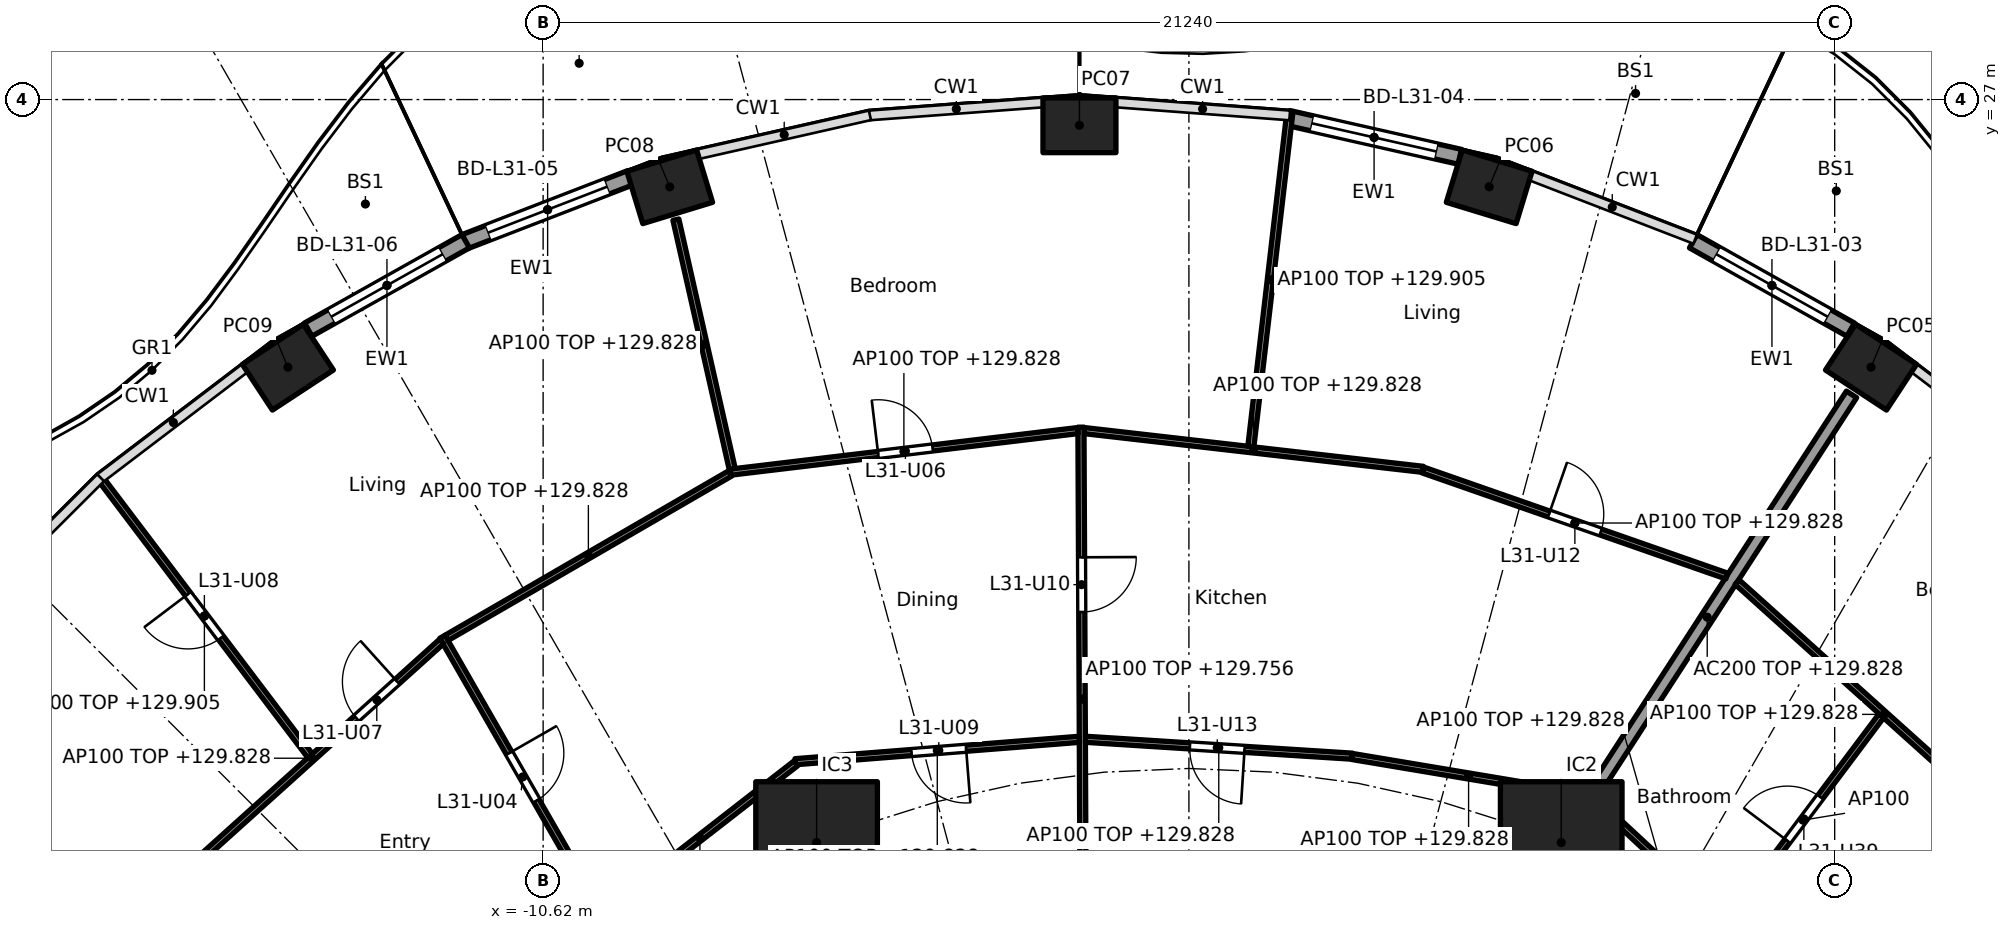
"""IFC4 building model, lengths in metres.
Left out: names, types, materials, properties, quantities, classifications, styles, units other than length and angle.
Written with IfcOpenShell. Run it as: python <this file> out.ifc"""

import sys

from ifc_helpers import new_model, si_unit, direction, frame, frame_2d, origin, origin_2d, place, context, subcontext, project, spatial, rectangle, hollow_rectangle, extrude, element, fill, save


model = new_model("IFC4")
c1 = context("Model", 3, precision=1e-05, world=origin(), true_north=direction((0.0, 1.0)))
c2 = subcontext(c1, "Body", "Model", "MODEL_VIEW")
j1 = project(units=[si_unit("LENGTHUNIT", "METRE"), si_unit("PLANEANGLEUNIT", "RADIAN")], contexts=[c1])
p1 = place(None, origin())
s1 = spatial("IfcSite", under=j1, at=p1, CompositionType="ELEMENT")
p2 = place(p1, origin())
s2 = spatial("IfcBuilding", under=s1, at=p2, CompositionType="ELEMENT")
p3 = place(p2, frame((0.0, 0.0, 127.0)))
s3 = spatial("IfcBuildingStorey", under=s2, at=p3, CompositionType="ELEMENT", Elevation=127.0)
for number, where, z_axis, x_axis in (
    (1, (11.218, 22.599, 0.0), (0.0, 0.0, 1.0), (-0.836, 0.549, 0.0)),
    (2, (4.938, 25.565, 0.0), (0.0, 0.0, 1.0), (-0.957, 0.292, 0.0)),
    (3, (-1.8, 26.577, 0.0), (0.0, 0.0, 1.0), (-1.0, 0.0, 0.0)),
    (4, (-8.538, 25.565, 0.0), (0.0, 0.0, 1.0), (-0.957, -0.292, 0.0)),
    (5, (-14.817, 22.599, 0.0), (0.0, 0.0, 1.0), (-0.836, -0.549, 0.0)),
):
    element("IfcColumn", number, at=place(p3, frame(where, z_axis=z_axis, x_axis=x_axis)), inside=s3, PredefinedType="COLUMN", context=c2, shape_type="SweptSolid", body=[
        extrude(hollow_rectangle(XDim=1.2, YDim=0.9, WallThickness=0.04, at=origin_2d()), origin(), (0.0, 0.0, 1.0), 3.7),
    ])
for number, where, z_axis, x_axis in (
    (6, (6.123, 14.782, 0.0), (0.0, 0.0, 1.0), (1.0, 0.0, 0.0)),
    (7, (-6.123, 14.782, 0.0), (0.0, 0.0, 1.0), (1.0, 0.0, 0.0)),
):
    element("IfcColumn", number, at=place(p3, frame(where, z_axis=z_axis, x_axis=x_axis)), inside=s3, PredefinedType="COLUMN", context=c2, shape_type="SweptSolid", body=[
        extrude(rectangle(XDim=2.0, YDim=2.0, at=origin_2d()), origin(), (0.0, 0.0, 1.0), 3.7),
    ])
p4 = place(p3, frame((8.293, 24.67, 0.0), z_axis=(0.0, 0.0, 1.0), x_axis=(0.87206688547, -0.489386705241, 0.0)))
e8 = element("IfcWall", 8, at=p4, inside=s3, PredefinedType="SOLIDWALL", context=c2, shape_type="SweptSolid", body=[
    extrude(rectangle(XDim=2.97, YDim=0.25, at=frame_2d((1.485, 0.0))), origin(), (0.0, 0.0, 1.0), 3.44),
])
p5 = place(p4, frame((0.435, 0.0, 0.0)))
e9 = element("IfcOpeningElement", 9, at=p5, cuts=e8, PredefinedType="OPENING", context=c2, shape_type="SweptSolid", body=[
    extrude(rectangle(XDim=2.1, YDim=2.4, at=frame_2d((1.05, 1.2))), frame((0.0, 0.135, 0.0), z_axis=(0.0, -1.0, 0.0), x_axis=(1.0, 0.0, 0.0)), (0.0, 0.0, 1.0), 0.27),
])
p6 = place(p3, frame((1.636, 26.697, 0.0), z_axis=(0.0, 0.0, 1.0), x_axis=(0.975339035722, -0.220711951186, 0.0)))
e10 = element("IfcWall", 10, at=p6, inside=s3, PredefinedType="SOLIDWALL", context=c2, shape_type="SweptSolid", body=[
    extrude(rectangle(XDim=2.89, YDim=0.25, at=frame_2d((1.445, 0.0))), origin(), (0.0, 0.0, 1.0), 3.44),
])
p7 = place(p6, frame((0.395, 0.0, 0.0)))
e11 = element("IfcOpeningElement", 11, at=p7, cuts=e10, PredefinedType="OPENING", context=c2, shape_type="SweptSolid", body=[
    extrude(rectangle(XDim=2.1, YDim=2.4, at=frame_2d((1.05, 1.2))), frame((0.0, 0.135, 0.0), z_axis=(0.0, -1.0, 0.0), x_axis=(1.0, 0.0, 0.0)), (0.0, 0.0, 1.0), 0.27),
])
p8 = place(p3, frame((-11.909, 24.662, 0.0), z_axis=(0.0, 0.0, 1.0), x_axis=(0.932845344347, 0.360277064952, 0.0)))
e12 = element("IfcWall", 12, at=p8, inside=s3, PredefinedType="SOLIDWALL", context=c2, shape_type="SweptSolid", body=[
    extrude(rectangle(XDim=2.923, YDim=0.25, at=frame_2d((1.462, 0.0))), origin(), (0.0, 0.0, 1.0), 3.44),
])
p9 = place(p8, frame((0.412, 0.0, 0.0)))
e13 = element("IfcOpeningElement", 13, at=p9, cuts=e12, PredefinedType="OPENING", context=c2, shape_type="SweptSolid", body=[
    extrude(rectangle(XDim=2.1, YDim=2.4, at=frame_2d((1.05, 1.2))), frame((0.0, 0.135, 0.0), z_axis=(0.0, -1.0, 0.0), x_axis=(1.0, 0.0, 0.0)), (0.0, 0.0, 1.0), 0.27),
])
p10 = place(p3, frame((-14.483, 23.217, 0.0), z_axis=(0.0, 0.0, 1.0), x_axis=(0.87206688547, 0.489386705241, 0.0)))
e14 = element("IfcWall", 14, at=p10, inside=s3, PredefinedType="SOLIDWALL", context=c2, shape_type="SweptSolid", body=[
    extrude(rectangle(XDim=2.97, YDim=0.25, at=frame_2d((1.485, 0.0))), origin(), (0.0, 0.0, 1.0), 3.44),
])
p11 = place(p10, frame((0.435, 0.0, 0.0)))
e15 = element("IfcOpeningElement", 15, at=p11, cuts=e14, PredefinedType="OPENING", context=c2, shape_type="SweptSolid", body=[
    extrude(rectangle(XDim=2.1, YDim=2.4, at=frame_2d((1.05, 1.2))), frame((0.0, 0.135, 0.0), z_axis=(0.0, -1.0, 0.0), x_axis=(1.0, 0.0, 0.0)), (0.0, 0.0, 1.0), 0.27),
])
p12 = place(p3, frame((5.243, 12.657, 0.0), z_axis=(0.0, 0.0, 1.0), x_axis=(0.38273085373, 0.923859888513, 0.0)))
e16 = element("IfcWall", 16, at=p12, inside=s3, PredefinedType="PARTITIONING", context=c2, shape_type="SweptSolid", body=[
    extrude(rectangle(XDim=2.199, YDim=0.2, at=frame_2d((1.1, 0.0))), origin(), (0.0, 0.0, 1.0), 3.44),
])
p13 = place(p3, frame((6.15, 14.824, 0.0), z_axis=(0.0, 0.0, 1.0), x_axis=(0.543695254109, 0.839282711998, 0.0)))
e17 = element("IfcWall", 17, at=p13, inside=s3, PredefinedType="PARTITIONING", context=c2, shape_type="SweptSolid", body=[
    extrude(rectangle(XDim=8.731, YDim=0.2, at=frame_2d((4.366, 0.0))), origin(), (0.0, 0.0, 1.0), 2.828),
])
p14 = place(p3, frame((13.856, 14.714, 0.0), z_axis=(0.0, 0.0, 1.0), x_axis=(-0.743799395746, 0.668402916577, 0.0)))
e18 = element("IfcWall", 18, at=p14, inside=s3, PredefinedType="PARTITIONING", context=c2, shape_type="SweptSolid", body=[
    extrude(rectangle(XDim=6.509, YDim=0.1, at=frame_2d((3.254, 0.0))), origin(), (0.0, 0.0, 1.0), 2.828),
])
p15 = place(p14, frame((1.19, 0.0, 0.0)))
e19 = element("IfcOpeningElement", 19, at=p15, cuts=e18, PredefinedType="OPENING", context=c2, shape_type="SweptSolid", body=[
    extrude(rectangle(XDim=0.9, YDim=2.1, at=frame_2d((0.45, 1.05))), frame((0.0, 0.06, 0.0), z_axis=(0.0, -1.0, 0.0), x_axis=(1.0, 0.0, 0.0)), (0.0, 0.0, 1.0), 0.12),
])
p16 = place(p3, frame((8.81, 13.434, 0.0), z_axis=(0.0, 0.0, 1.0), x_axis=(0.600491337497, 0.799631261014, 0.0)))
e20 = element("IfcWall", 20, at=p16, inside=s3, PredefinedType="PARTITIONING", context=c2, shape_type="SweptSolid", body=[
    extrude(rectangle(XDim=4.292, YDim=0.1, at=frame_2d((2.146, 0.0))), origin(), (0.0, 0.0, 1.0), 3.44),
])
p17 = place(p16, frame((1.721, 0.0, 0.0)))
e21 = element("IfcOpeningElement", 21, at=p17, cuts=e20, PredefinedType="OPENING", context=c2, shape_type="SweptSolid", body=[
    extrude(rectangle(XDim=0.9, YDim=2.1, at=frame_2d((0.45, 1.05))), frame((0.0, 0.06, 0.0), z_axis=(0.0, -1.0, 0.0), x_axis=(1.0, 0.0, 0.0)), (0.0, 0.0, 1.0), 0.12),
])
p18 = place(p3, frame((8.803, 13.508, 0.0), z_axis=(0.0, 0.0, 1.0), x_axis=(-0.733124766325, 0.680094167745, 0.0)))
e22 = element("IfcWall", 22, at=p18, inside=s3, PredefinedType="PARTITIONING", context=c2, shape_type="SweptSolid", body=[
    extrude(rectangle(XDim=2.886, YDim=0.1, at=frame_2d((1.443, 0.0))), origin(), (0.0, 0.0, 1.0), 2.828),
])
p19 = place(p3, frame((6.515, 15.556, 0.0), z_axis=(0.0, 0.0, 1.0), x_axis=(-0.986271328884, 0.16513287323, 0.0)))
e23 = element("IfcWall", 23, at=p19, inside=s3, PredefinedType="PARTITIONING", context=c2, shape_type="SweptSolid", body=[
    extrude(rectangle(XDim=3.884, YDim=0.1, at=frame_2d((1.942, 0.0))), origin(), (0.0, 0.0, 1.0), 2.828),
])
p20 = place(p3, frame((8.846, 19.165, 0.0), z_axis=(0.0, 0.0, 1.0), x_axis=(-0.944186503813, 0.329411362915, 0.0)))
e24 = element("IfcWall", 24, at=p20, inside=s3, PredefinedType="PARTITIONING", context=c2, shape_type="SweptSolid", body=[
    extrude(rectangle(XDim=5.293, YDim=0.1, at=frame_2d((2.646, 0.0))), origin(), (0.0, 0.0, 1.0), 2.828),
])
p21 = place(p20, frame((2.197, 0.0, 0.0)))
e25 = element("IfcOpeningElement", 25, at=p21, cuts=e24, PredefinedType="OPENING", context=c2, shape_type="SweptSolid", body=[
    extrude(rectangle(XDim=0.9, YDim=2.1, at=frame_2d((0.45, 1.05))), frame((0.0, 0.06, 0.0), z_axis=(0.0, -1.0, 0.0), x_axis=(1.0, 0.0, 0.0)), (0.0, 0.0, 1.0), 0.12),
])
p22 = place(p3, frame((2.685, 16.202, 0.0), z_axis=(0.0, 0.0, 1.0), x_axis=(-0.998000808042, 0.063201164138, 0.0)))
e26 = element("IfcWall", 26, at=p22, inside=s3, PredefinedType="PARTITIONING", context=c2, shape_type="SweptSolid", body=[
    extrude(rectangle(XDim=4.396, YDim=0.1, at=frame_2d((2.198, 0.0))), origin(), (0.0, 0.0, 1.0), 2.828),
])
p23 = place(p22, frame((1.773, 0.0, 0.0)))
e27 = element("IfcOpeningElement", 27, at=p23, cuts=e26, PredefinedType="OPENING", context=c2, shape_type="SweptSolid", body=[
    extrude(rectangle(XDim=0.9, YDim=2.1, at=frame_2d((0.45, 1.05))), frame((0.0, 0.06, 0.0), z_axis=(0.0, -1.0, 0.0), x_axis=(1.0, 0.0, 0.0)), (0.0, 0.0, 1.0), 0.12),
])
p24 = place(p3, frame((3.851, 20.919, 0.0), z_axis=(0.0, 0.0, 1.0), x_axis=(-0.993519908136, 0.11365822512, 0.0)))
e28 = element("IfcWall", 28, at=p24, inside=s3, PredefinedType="PARTITIONING", context=c2, shape_type="SweptSolid", body=[
    extrude(rectangle(XDim=5.613, YDim=0.1, at=frame_2d((2.806, 0.0))), origin(), (0.0, 0.0, 1.0), 2.828),
])
p25 = place(p3, frame((1.019, 21.293, 0.0), z_axis=(0.0, 0.0, 1.0), x_axis=(0.11589741608, 0.993261188684, 0.0)))
e29 = element("IfcWall", 29, at=p25, inside=s3, PredefinedType="PARTITIONING", context=c2, shape_type="SweptSolid", body=[
    extrude(rectangle(XDim=5.523, YDim=0.1, at=frame_2d((2.762, 0.0))), origin(), (0.0, 0.0, 1.0), 2.905),
])
p26 = place(p3, frame((-1.735, 12.665, 0.0), z_axis=(0.0, 0.0, 1.0), x_axis=(-0.004474716456, 0.999989988406, 0.0)))
e30 = element("IfcWall", 30, at=p26, inside=s3, PredefinedType="PARTITIONING", context=c2, shape_type="SweptSolid", body=[
    extrude(rectangle(XDim=8.948, YDim=0.1, at=frame_2d((4.474, 0.0))), origin(), (0.0, 0.0, 1.0), 2.756),
])
p27 = place(p26, frame((5.908, 0.0, 0.0)))
e31 = element("IfcOpeningElement", 31, at=p27, cuts=e30, PredefinedType="OPENING", context=c2, shape_type="SweptSolid", body=[
    extrude(rectangle(XDim=0.9, YDim=2.1, at=frame_2d((0.45, 1.05))), frame((0.0, 0.06, 0.0), z_axis=(0.0, -1.0, 0.0), x_axis=(1.0, 0.0, 0.0)), (0.0, 0.0, 1.0), 0.12),
])
p28 = place(p3, frame((-1.802, 16.479, 0.0), z_axis=(0.0, 0.0, 1.0), x_axis=(-0.996909003513, -0.078564869469, 0.0)))
e32 = element("IfcWall", 32, at=p28, inside=s3, PredefinedType="PARTITIONING", context=c2, shape_type="SweptSolid", body=[
    extrude(rectangle(XDim=4.686, YDim=0.1, at=frame_2d((2.343, 0.0))), origin(), (0.0, 0.0, 1.0), 2.828),
])
p29 = place(p28, frame((1.868, 0.0, 0.0)))
e33 = element("IfcOpeningElement", 33, at=p29, cuts=e32, PredefinedType="OPENING", context=c2, shape_type="SweptSolid", body=[
    extrude(rectangle(XDim=0.9, YDim=2.1, at=frame_2d((0.45, 1.05))), frame((0.0, 0.06, 0.0), z_axis=(0.0, -1.0, 0.0), x_axis=(1.0, 0.0, 0.0)), (0.0, 0.0, 1.0), 0.12),
])
p30 = place(p3, frame((-1.825, 21.557, 0.0), z_axis=(0.0, 0.0, 1.0), x_axis=(-0.992915657947, -0.118821278412, 0.0)))
e34 = element("IfcWall", 34, at=p30, inside=s3, PredefinedType="PARTITIONING", context=c2, shape_type="SweptSolid", body=[
    extrude(rectangle(XDim=5.765, YDim=0.1, at=frame_2d((2.883, 0.0))), origin(), (0.0, 0.0, 1.0), 2.828),
])
p31 = place(p30, frame((2.408, 0.0, 0.0)))
e35 = element("IfcOpeningElement", 35, at=p31, cuts=e34, PredefinedType="OPENING", context=c2, shape_type="SweptSolid", body=[
    extrude(rectangle(XDim=0.9, YDim=2.1, at=frame_2d((0.45, 1.05))), frame((0.0, 0.06, 0.0), z_axis=(0.0, -1.0, 0.0), x_axis=(1.0, 0.0, 0.0)), (0.0, 0.0, 1.0), 0.12),
])
p32 = place(p3, frame((-5.243, 12.657, 0.0), z_axis=(0.0, 0.0, 1.0), x_axis=(-0.382719158442, 0.923864733477, 0.0)))
e36 = element("IfcWall", 36, at=p32, inside=s3, PredefinedType="PARTITIONING", context=c2, shape_type="SweptSolid", body=[
    extrude(rectangle(XDim=2.25, YDim=0.1, at=frame_2d((1.125, 0.0))), origin(), (0.0, 0.0, 1.0), 3.44),
])
p33 = place(p3, frame((-6.463, 16.084, 0.0), z_axis=(0.0, 0.0, 1.0), x_axis=(-0.789457442969, -0.613805299538, 0.0)))
e37 = element("IfcWall", 37, at=p33, inside=s3, PredefinedType="PARTITIONING", context=c2, shape_type="SweptSolid", body=[
    extrude(rectangle(XDim=3.997, YDim=0.1, at=frame_2d((1.999, 0.0))), origin(), (0.0, 0.0, 1.0), 2.828),
])
p34 = place(p3, frame((-7.511, 20.927, 0.0), z_axis=(0.0, 0.0, 1.0), x_axis=(-0.220337559031, 0.975423682345, 0.0)))
e38 = element("IfcWall", 38, at=p34, inside=s3, PredefinedType="PARTITIONING", context=c2, shape_type="SweptSolid", body=[
    extrude(rectangle(XDim=4.202, YDim=0.1, at=frame_2d((2.101, 0.0))), origin(), (0.0, 0.0, 1.0), 2.828),
])
p35 = place(p3, frame((-7.543, 20.853, 0.0), z_axis=(0.0, 0.0, 1.0), x_axis=(-0.865086194899, -0.501623240485, 0.0)))
e39 = element("IfcWall", 39, at=p35, inside=s3, PredefinedType="PARTITIONING", context=c2, shape_type="SweptSolid", body=[
    extrude(rectangle(XDim=5.393, YDim=0.1, at=frame_2d((2.697, 0.0))), origin(), (0.0, 0.0, 1.0), 2.828),
])
p36 = place(p3, frame((-7.708, 10.198, 0.0), z_axis=(0.0, 0.0, 1.0), x_axis=(-0.497449462689, 0.867492957937, 0.0)))
e40 = element("IfcWall", 40, at=p36, inside=s3, PredefinedType="PARTITIONING", context=c2, shape_type="SweptSolid", body=[
    extrude(rectangle(XDim=9.185, YDim=0.1, at=frame_2d((4.592, 0.0))), origin(), (0.0, 0.0, 1.0), 2.756),
])
p37 = place(p36, frame((1.511, 0.0, 0.0)))
e41 = element("IfcOpeningElement", 41, at=p37, cuts=e40, PredefinedType="OPENING", context=c2, shape_type="SweptSolid", body=[
    extrude(rectangle(XDim=0.9, YDim=2.1, at=frame_2d((0.45, 1.05))), frame((0.0, 0.06, 0.0), z_axis=(0.0, -1.0, 0.0), x_axis=(1.0, 0.0, 0.0)), (0.0, 0.0, 1.0), 0.12),
])
p38 = place(p36, frame((6.078, 0.0, 0.0)))
e42 = element("IfcOpeningElement", 42, at=p38, cuts=e40, PredefinedType="OPENING", context=c2, shape_type="SweptSolid", body=[
    extrude(rectangle(XDim=0.9, YDim=2.1, at=frame_2d((0.45, 1.05))), frame((0.0, 0.06, 0.0), z_axis=(0.0, -1.0, 0.0), x_axis=(1.0, 0.0, 0.0)), (0.0, 0.0, 1.0), 0.12),
])
p39 = place(p3, frame((-12.289, 18.089, 0.0), z_axis=(0.0, 0.0, 1.0), x_axis=(-0.743146066164, -0.669129228435, 0.0)))
e43 = element("IfcWall", 43, at=p39, inside=s3, PredefinedType="PARTITIONING", context=c2, shape_type="SweptSolid", body=[
    extrude(rectangle(XDim=5.739, YDim=0.1, at=frame_2d((2.87, 0.0))), origin(), (0.0, 0.0, 1.0), 2.828),
])
p40 = place(p39, frame((0.985, 0.0, 0.0)))
e44 = element("IfcOpeningElement", 44, at=p40, cuts=e43, PredefinedType="OPENING", context=c2, shape_type="SweptSolid", body=[
    extrude(rectangle(XDim=0.9, YDim=2.1, at=frame_2d((0.45, 1.05))), frame((0.0, 0.06, 0.0), z_axis=(0.0, -1.0, 0.0), x_axis=(1.0, 0.0, 0.0)), (0.0, 0.0, 1.0), 0.12),
])
p41 = place(p3, frame((-14.452, 16.208, 0.0), z_axis=(0.0, 0.0, 1.0), x_axis=(-0.603267974074, 0.797538557975, 0.0)))
e45 = element("IfcWall", 45, at=p41, inside=s3, PredefinedType="PARTITIONING", context=c2, shape_type="SweptSolid", body=[
    extrude(rectangle(XDim=5.764, YDim=0.1, at=frame_2d((2.882, 0.0))), origin(), (0.0, 0.0, 1.0), 2.905),
])
p42 = place(p41, frame((2.432, 0.0, 0.0)))
e46 = element("IfcOpeningElement", 46, at=p42, cuts=e45, PredefinedType="OPENING", context=c2, shape_type="SweptSolid", body=[
    extrude(rectangle(XDim=0.9, YDim=2.1, at=frame_2d((0.45, 1.05))), frame((0.0, 0.06, 0.0), z_axis=(0.0, -1.0, 0.0), x_axis=(1.0, 0.0, 0.0)), (0.0, 0.0, 1.0), 0.12),
])
p43 = place(p5, origin())
e47 = element("IfcDoor", 47, at=p43, inside=s3, OperationType="SLIDING_TO_LEFT", PredefinedType="DOOR", context=c2, shape_type="SweptSolid", body=[
    extrude(rectangle(XDim=2.1, YDim=2.4, at=frame_2d((1.05, 1.2))), frame((0.0, 0.025, 0.0), z_axis=(0.0, -1.0, 0.0), x_axis=(1.0, 0.0, 0.0)), (0.0, 0.0, 1.0), 0.05),
])
fill(e9, e47)
p44 = place(p7, origin())
e48 = element("IfcDoor", 48, at=p44, inside=s3, OperationType="SLIDING_TO_LEFT", PredefinedType="DOOR", context=c2, shape_type="SweptSolid", body=[
    extrude(rectangle(XDim=2.1, YDim=2.4, at=frame_2d((1.05, 1.2))), frame((0.0, 0.025, 0.0), z_axis=(0.0, -1.0, 0.0), x_axis=(1.0, 0.0, 0.0)), (0.0, 0.0, 1.0), 0.05),
])
fill(e11, e48)
p45 = place(p9, origin())
e49 = element("IfcDoor", 49, at=p45, inside=s3, OperationType="SLIDING_TO_LEFT", PredefinedType="DOOR", context=c2, shape_type="SweptSolid", body=[
    extrude(rectangle(XDim=2.1, YDim=2.4, at=frame_2d((1.05, 1.2))), frame((0.0, 0.025, 0.0), z_axis=(0.0, -1.0, 0.0), x_axis=(1.0, 0.0, 0.0)), (0.0, 0.0, 1.0), 0.05),
])
fill(e13, e49)
p46 = place(p11, origin())
e50 = element("IfcDoor", 50, at=p46, inside=s3, OperationType="SLIDING_TO_LEFT", PredefinedType="DOOR", context=c2, shape_type="SweptSolid", body=[
    extrude(rectangle(XDim=2.1, YDim=2.4, at=frame_2d((1.05, 1.2))), frame((0.0, 0.025, 0.0), z_axis=(0.0, -1.0, 0.0), x_axis=(1.0, 0.0, 0.0)), (0.0, 0.0, 1.0), 0.05),
])
fill(e15, e50)
p47 = place(p38, frame((0.9, 0.0, 0.0), x_axis=(-1.0, 0.0, 0.0)))
e51 = element("IfcDoor", 51, at=p47, inside=s3, OperationType="SINGLE_SWING_LEFT", PredefinedType="DOOR", context=c2, shape_type="SweptSolid", body=[
    extrude(rectangle(XDim=0.9, YDim=2.1, at=frame_2d((0.45, 1.05))), frame((0.0, 0.025, 0.0), z_axis=(0.0, -1.0, 0.0), x_axis=(1.0, 0.0, 0.0)), (0.0, 0.0, 1.0), 0.05),
])
fill(e42, e51)
p48 = place(p31, frame((0.9, 0.0, 0.0), x_axis=(-1.0, 0.0, 0.0)))
e52 = element("IfcDoor", 52, at=p48, inside=s3, OperationType="SINGLE_SWING_LEFT", PredefinedType="DOOR", context=c2, shape_type="SweptSolid", body=[
    extrude(rectangle(XDim=0.9, YDim=2.1, at=frame_2d((0.45, 1.05))), frame((0.0, 0.025, 0.0), z_axis=(0.0, -1.0, 0.0), x_axis=(1.0, 0.0, 0.0)), (0.0, 0.0, 1.0), 0.05),
])
fill(e35, e52)
p49 = place(p40, frame((0.9, 0.0, 0.0), x_axis=(-1.0, 0.0, 0.0)))
e53 = element("IfcDoor", 53, at=p49, inside=s3, OperationType="SINGLE_SWING_RIGHT", PredefinedType="DOOR", context=c2, shape_type="SweptSolid", body=[
    extrude(rectangle(XDim=0.9, YDim=2.1, at=frame_2d((0.45, 1.05))), frame((0.0, 0.025, 0.0), z_axis=(0.0, -1.0, 0.0), x_axis=(1.0, 0.0, 0.0)), (0.0, 0.0, 1.0), 0.05),
])
fill(e44, e53)
p50 = place(p42, origin())
e54 = element("IfcDoor", 54, at=p50, inside=s3, OperationType="SINGLE_SWING_RIGHT", PredefinedType="DOOR", context=c2, shape_type="SweptSolid", body=[
    extrude(rectangle(XDim=0.9, YDim=2.1, at=frame_2d((0.45, 1.05))), frame((0.0, 0.025, 0.0), z_axis=(0.0, -1.0, 0.0), x_axis=(1.0, 0.0, 0.0)), (0.0, 0.0, 1.0), 0.05),
])
fill(e46, e54)
p51 = place(p29, origin())
e55 = element("IfcDoor", 55, at=p51, inside=s3, OperationType="SINGLE_SWING_LEFT", PredefinedType="DOOR", context=c2, shape_type="SweptSolid", body=[
    extrude(rectangle(XDim=0.9, YDim=2.1, at=frame_2d((0.45, 1.05))), frame((0.0, 0.025, 0.0), z_axis=(0.0, -1.0, 0.0), x_axis=(1.0, 0.0, 0.0)), (0.0, 0.0, 1.0), 0.05),
])
fill(e33, e55)
p52 = place(p27, frame((0.9, 0.0, 0.0), x_axis=(-1.0, 0.0, 0.0)))
e56 = element("IfcDoor", 56, at=p52, inside=s3, OperationType="SINGLE_SWING_LEFT", PredefinedType="DOOR", context=c2, shape_type="SweptSolid", body=[
    extrude(rectangle(XDim=0.9, YDim=2.1, at=frame_2d((0.45, 1.05))), frame((0.0, 0.025, 0.0), z_axis=(0.0, -1.0, 0.0), x_axis=(1.0, 0.0, 0.0)), (0.0, 0.0, 1.0), 0.05),
])
fill(e31, e56)
p53 = place(p21, frame((0.9, 0.0, 0.0), x_axis=(-1.0, 0.0, 0.0)))
e57 = element("IfcDoor", 57, at=p53, inside=s3, OperationType="SINGLE_SWING_LEFT", PredefinedType="DOOR", context=c2, shape_type="SweptSolid", body=[
    extrude(rectangle(XDim=0.9, YDim=2.1, at=frame_2d((0.45, 1.05))), frame((0.0, 0.025, 0.0), z_axis=(0.0, -1.0, 0.0), x_axis=(1.0, 0.0, 0.0)), (0.0, 0.0, 1.0), 0.05),
])
fill(e25, e57)
p54 = place(p23, origin())
e58 = element("IfcDoor", 58, at=p54, inside=s3, OperationType="SINGLE_SWING_LEFT", PredefinedType="DOOR", context=c2, shape_type="SweptSolid", body=[
    extrude(rectangle(XDim=0.9, YDim=2.1, at=frame_2d((0.45, 1.05))), frame((0.0, 0.025, 0.0), z_axis=(0.0, -1.0, 0.0), x_axis=(1.0, 0.0, 0.0)), (0.0, 0.0, 1.0), 0.05),
])
fill(e27, e58)
p55 = place(p17, origin())
e59 = element("IfcDoor", 59, at=p55, inside=s3, OperationType="SINGLE_SWING_LEFT", PredefinedType="DOOR", context=c2, shape_type="SweptSolid", body=[
    extrude(rectangle(XDim=0.9, YDim=2.1, at=frame_2d((0.45, 1.05))), frame((0.0, 0.025, 0.0), z_axis=(0.0, -1.0, 0.0), x_axis=(1.0, 0.0, 0.0)), (0.0, 0.0, 1.0), 0.05),
])
fill(e21, e59)
save(model, sys.argv[1])
